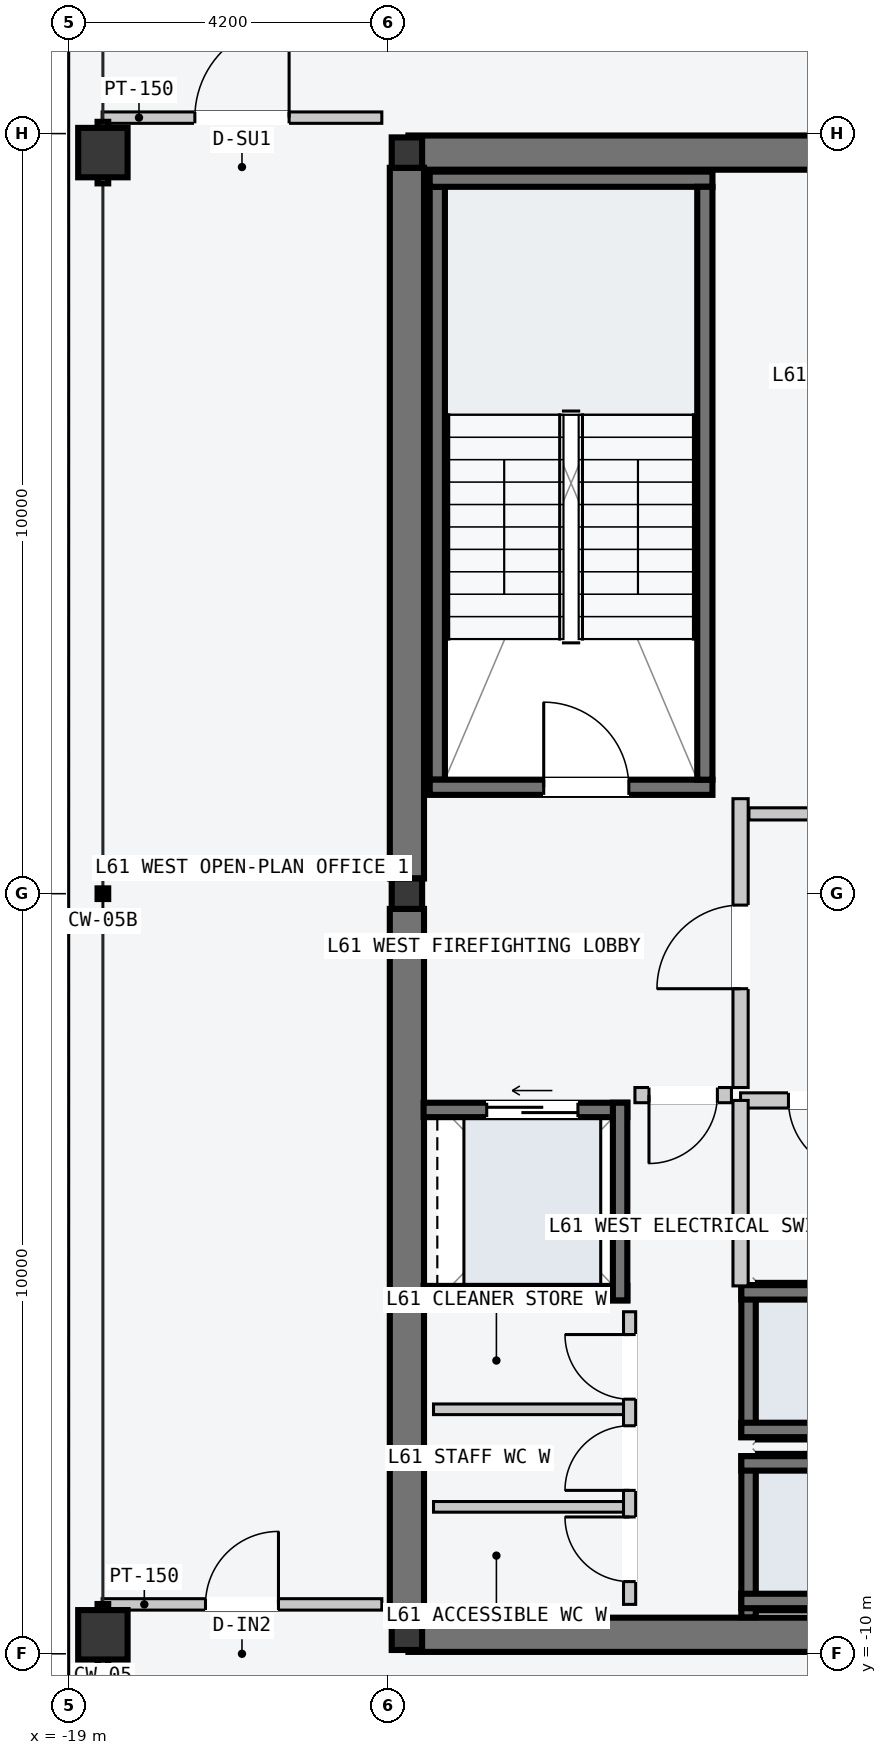
"""IFC4 building model, lengths in metres.
Left out: names, types, materials, properties, quantities, classifications, styles, units other than length and angle.
Written with IfcOpenShell. Run it as: python <this file> out.ifc"""

import sys

from ifc_helpers import new_model, si_unit, direction, frame, frame_2d, origin, origin_2d, place, context, subcontext, project, spatial, rectangle, hollow_rectangle, i_section, extrude, element, fill, save


model = new_model("IFC4")
c1 = context("Model", 3, precision=1e-05, world=origin(), true_north=direction((0.0, 1.0)))
c2 = subcontext(c1, "Body", "Model", "MODEL_VIEW")
j1 = project(units=[si_unit("LENGTHUNIT", "METRE"), si_unit("PLANEANGLEUNIT", "RADIAN")], contexts=[c1])
p1 = place(None, origin())
s1 = spatial("IfcSite", under=j1, at=p1, CompositionType="ELEMENT")
p2 = place(p1, origin())
s2 = spatial("IfcBuilding", under=s1, at=p2, CompositionType="ELEMENT")
p3 = place(p2, frame((0.0, 0.0, 232.8)))
s3 = spatial("IfcBuildingStorey", under=s2, at=p3, CompositionType="ELEMENT", Elevation=232.8)
for number, where, z_axis, x_axis in (
    (1, (-14.53, -9.75, -0.2), (0.0, 0.0, 1.0), (1.0, 0.0, 0.0)),
    (2, (-14.53, 9.75, -0.2), (0.0, 0.0, 1.0), (1.0, 0.0, 0.0)),
):
    element("IfcWall", number, at=place(p3, frame(where, z_axis=z_axis, x_axis=x_axis)), inside=s3, PredefinedType="SHEAR", context=c2, shape_type="SweptSolid", body=[
        extrude(rectangle(XDim=6.46, YDim=0.45, at=frame_2d((3.23, 0.0))), origin(), (0.0, 0.0, 1.0), 3.6),
    ])
for number, where, z_axis, x_axis in (
    (3, (-14.55, -9.55, -0.2), (0.0, 0.0, 1.0), (0.0, 1.0, 0.0)),
    (4, (-14.55, 0.2, -0.2), (0.0, 0.0, 1.0), (0.0, 1.0, 0.0)),
):
    element("IfcWall", number, at=place(p3, frame(where, z_axis=z_axis, x_axis=x_axis)), inside=s3, PredefinedType="SHEAR", context=c2, shape_type="SweptSolid", body=[
        extrude(rectangle(XDim=9.35, YDim=0.45, at=frame_2d((4.675, 0.0))), origin(), (0.0, 0.0, 1.0), 3.6),
    ])
p4 = place(p3, frame((-14.15, 1.5, -0.2), z_axis=(0.0, 0.0, 1.0), x_axis=(0.0, 1.0, 0.0)))
e5 = element("IfcWall", 5, at=p4, inside=s3, PredefinedType="SOLIDWALL", context=c2, shape_type="SweptSolid", body=[
    extrude(rectangle(XDim=7.8, YDim=0.2, at=frame_2d((3.9, 0.0))), origin(), (0.0, 0.0, 1.0), 3.6),
])
p5 = place(p3, frame((-14.25, 1.4, -0.2), z_axis=(0.0, 0.0, 1.0), x_axis=(1.0, 0.0, 0.0)))
e6 = element("IfcWall", 6, at=p5, inside=s3, PredefinedType="SOLIDWALL", context=c2, shape_type="SweptSolid", body=[
    extrude(rectangle(XDim=3.72, YDim=0.2, at=frame_2d((1.86, 0.0))), origin(), (0.0, 0.0, 1.0), 3.6),
])
p6 = place(p5, frame((1.5, 0.0, 0.2)))
e7 = element("IfcOpeningElement", 7, at=p6, cuts=e6, PredefinedType="OPENING", context=c2, shape_type="SweptSolid", body=[
    extrude(rectangle(XDim=1.12, YDim=2.18, at=frame_2d((0.56, 1.09))), frame((0.0, 0.11, 0.0), z_axis=(0.0, -1.0, 0.0), x_axis=(1.0, 0.0, 0.0)), (0.0, 0.0, 1.0), 0.22),
])
p7 = place(p3, frame((-14.25, 9.4, -0.2), z_axis=(0.0, 0.0, 1.0), x_axis=(1.0, 0.0, 0.0)))
e8 = element("IfcWall", 8, at=p7, inside=s3, PredefinedType="SOLIDWALL", context=c2, shape_type="SweptSolid", body=[
    extrude(rectangle(XDim=3.72, YDim=0.2, at=frame_2d((1.86, 0.0))), origin(), (0.0, 0.0, 1.0), 3.6),
])
p8 = place(p3, frame((-10.63, 1.5, -0.2), z_axis=(0.0, 0.0, 1.0), x_axis=(0.0, 1.0, 0.0)))
e9 = element("IfcWall", 9, at=p8, inside=s3, PredefinedType="SOLIDWALL", context=c2, shape_type="SweptSolid", body=[
    extrude(rectangle(XDim=7.8, YDim=0.2, at=frame_2d((3.9, 0.0))), origin(), (0.0, 0.0, 1.0), 3.6),
])
for number, where, z_axis, x_axis in (
    (10, (-14.55, -9.75, 0.0), (0.0, 0.0, 1.0), (1.0, 0.0, 0.0)),
    (11, (-14.55, 0.0, 0.0), (0.0, 0.0, 1.0), (1.0, 0.0, 0.0)),
    (12, (-14.55, 9.75, 0.0), (0.0, 0.0, 1.0), (1.0, 0.0, 0.0)),
):
    element("IfcColumn", number, at=place(p3, frame(where, z_axis=z_axis, x_axis=x_axis)), inside=s3, PredefinedType="COLUMN", context=c2, shape_type="SweptSolid", body=[
        extrude(i_section(OverallWidth=0.4, OverallDepth=0.4, WebThickness=0.013, FlangeThickness=0.021, at=origin_2d()), origin(), (0.0, 0.0, 1.0), 3.6),
    ])
for number, where, z_axis, x_axis in (
    (13, (-18.55, -9.75, 0.0), (0.0, 0.0, 1.0), (0.0, 1.0, 0.0)),
    (14, (-18.55, 9.75, 0.0), (0.0, 0.0, 1.0), (0.0, 1.0, 0.0)),
):
    element("IfcColumn", number, at=place(p3, frame(where, z_axis=z_axis, x_axis=x_axis)), inside=s3, PredefinedType="COLUMN", context=c2, shape_type="SweptSolid", body=[
        extrude(hollow_rectangle(XDim=0.65, YDim=0.65, WallThickness=0.028, at=origin_2d()), origin(), (0.0, 0.0, 1.0), 3.6),
    ])
p9 = place(p3, frame((-10.055, -9.52, -0.2), z_axis=(0.0, 0.0, 1.0), x_axis=(0.0, 1.0, 0.0)))
e15 = element("IfcWall", 15, at=p9, inside=s3, PredefinedType="SOLIDWALL", context=c2, shape_type="SweptSolid", body=[
    extrude(rectangle(XDim=2.12, YDim=0.19, at=frame_2d((1.06, 0.0))), origin(), (0.0, 0.0, 1.0), 3.6),
])
for number, where, z_axis, x_axis in (
    (16, (-10.15, -7.495, -0.2), (0.0, 0.0, 1.0), (1.0, 0.0, 0.0)),
    (17, (-10.15, -9.305, -0.2), (0.0, 0.0, 1.0), (1.0, 0.0, 0.0)),
):
    element("IfcWall", number, at=place(p3, frame(where, z_axis=z_axis, x_axis=x_axis)), inside=s3, PredefinedType="SOLIDWALL", context=c2, shape_type="SweptSolid", body=[
        extrude(rectangle(XDim=2.2, YDim=0.19, at=frame_2d((1.1, 0.0))), origin(), (0.0, 0.0, 1.0), 3.6),
    ])
p10 = place(p3, frame((-10.055, -7.15, -0.2), z_axis=(0.0, 0.0, 1.0), x_axis=(0.0, 1.0, 0.0)))
e18 = element("IfcWall", 18, at=p10, inside=s3, PredefinedType="SOLIDWALL", context=c2, shape_type="SweptSolid", body=[
    extrude(rectangle(XDim=2.0, YDim=0.19, at=frame_2d((1.0, 0.0))), origin(), (0.0, 0.0, 1.0), 3.6),
])
for number, where, z_axis, x_axis in (
    (19, (-10.15, -5.245, -0.2), (0.0, 0.0, 1.0), (1.0, 0.0, 0.0)),
    (20, (-10.15, -7.055, -0.2), (0.0, 0.0, 1.0), (1.0, 0.0, 0.0)),
):
    element("IfcWall", number, at=place(p3, frame(where, z_axis=z_axis, x_axis=x_axis)), inside=s3, PredefinedType="SOLIDWALL", context=c2, shape_type="SweptSolid", body=[
        extrude(rectangle(XDim=2.2, YDim=0.19, at=frame_2d((1.1, 0.0))), origin(), (0.0, 0.0, 1.0), 3.6),
    ])
p11 = place(p3, frame((-14.33, -2.845, -0.2), z_axis=(0.0, 0.0, 1.0), x_axis=(1.0, 0.0, 0.0)))
e21 = element("IfcWall", 21, at=p11, inside=s3, PredefinedType="SOLIDWALL", context=c2, shape_type="SweptSolid", body=[
    extrude(rectangle(XDim=2.68, YDim=0.19, at=frame_2d((1.34, 0.0))), origin(), (0.0, 0.0, 1.0), 3.6),
])
p12 = place(p11, frame((0.83, 0.0, 0.2)))
e22 = element("IfcOpeningElement", 22, at=p12, cuts=e21, PredefinedType="OPENING", context=c2, shape_type="SweptSolid", body=[
    extrude(rectangle(XDim=1.2, YDim=2.2, at=frame_2d((0.6, 1.1))), frame((0.0, 0.105, 0.0), z_axis=(0.0, -1.0, 0.0), x_axis=(1.0, 0.0, 0.0)), (0.0, 0.0, 1.0), 0.21),
])
p13 = place(p3, frame((-14.33, -5.255, -0.2), z_axis=(0.0, 0.0, 1.0), x_axis=(1.0, 0.0, 0.0)))
e23 = element("IfcWall", 23, at=p13, inside=s3, PredefinedType="SOLIDWALL", context=c2, shape_type="SweptSolid", body=[
    extrude(rectangle(XDim=2.68, YDim=0.19, at=frame_2d((1.34, 0.0))), origin(), (0.0, 0.0, 1.0), 3.6),
])
p14 = place(p3, frame((-11.745, -5.35, -0.2), z_axis=(0.0, 0.0, 1.0), x_axis=(0.0, 1.0, 0.0)))
e24 = element("IfcWall", 24, at=p14, inside=s3, PredefinedType="SOLIDWALL", context=c2, shape_type="SweptSolid", body=[
    extrude(rectangle(XDim=2.6, YDim=0.19, at=frame_2d((1.3, 0.0))), origin(), (0.0, 0.0, 1.0), 3.6),
])
p15 = place(p3, frame((-10.16, -2.55, 0.0), z_axis=(0.0, 0.0, 1.0), x_axis=(0.0, 1.0, 0.0)))
e25 = element("IfcWall", 25, at=p15, inside=s3, PredefinedType="PARTITIONING", context=c2, shape_type="SweptSolid", body=[
    extrude(rectangle(XDim=3.8, YDim=0.2, at=frame_2d((1.9, 0.0))), origin(), (0.0, 0.0, 1.0), 3.4),
])
p16 = place(p15, frame((1.3, 0.0, 0.0)))
e26 = element("IfcOpeningElement", 26, at=p16, cuts=e25, PredefinedType="OPENING", context=c2, shape_type="SweptSolid", body=[
    extrude(rectangle(XDim=1.1, YDim=2.15, at=frame_2d((0.55, 1.075))), frame((0.0, 0.11, 0.0), z_axis=(0.0, -1.0, 0.0), x_axis=(1.0, 0.0, 0.0)), (0.0, 0.0, 1.0), 0.22),
])
p17 = place(p3, frame((-10.28, -2.65, 0.0), z_axis=(0.0, 0.0, 1.0), x_axis=(-1.0, 0.0, 0.0)))
e27 = element("IfcWall", 27, at=p17, inside=s3, PredefinedType="PARTITIONING", context=c2, shape_type="SweptSolid", body=[
    extrude(rectangle(XDim=1.27, YDim=0.2, at=frame_2d((0.635, 0.0))), origin(), (0.0, 0.0, 1.0), 3.4),
])
p18 = place(p17, frame((0.185, 0.0, 0.0)))
e28 = element("IfcOpeningElement", 28, at=p18, cuts=e27, PredefinedType="OPENING", context=c2, shape_type="SweptSolid", body=[
    extrude(rectangle(XDim=0.9, YDim=2.15, at=frame_2d((0.45, 1.075))), frame((0.0, 0.11, 0.0), z_axis=(0.0, -1.0, 0.0), x_axis=(1.0, 0.0, 0.0)), (0.0, 0.0, 1.0), 0.22),
])
p19 = place(p3, frame((-7.96, -2.72, 0.0), z_axis=(0.0, 0.0, 1.0), x_axis=(-1.0, 0.0, 0.0)))
e29 = element("IfcWall", 29, at=p19, inside=s3, PredefinedType="PARTITIONING", context=c2, shape_type="SweptSolid", body=[
    extrude(rectangle(XDim=2.2, YDim=0.2, at=frame_2d((1.1, 0.0))), origin(), (0.0, 0.0, 1.0), 3.4),
])
p20 = place(p19, frame((0.62, 0.0, 0.0)))
e30 = element("IfcOpeningElement", 30, at=p20, cuts=e29, PredefinedType="OPENING", context=c2, shape_type="SweptSolid", body=[
    extrude(rectangle(XDim=0.95, YDim=2.1, at=frame_2d((0.475, 1.05))), frame((0.0, 0.11, 0.0), z_axis=(0.0, -1.0, 0.0), x_axis=(1.0, 0.0, 0.0)), (0.0, 0.0, 1.0), 0.22),
])
p21 = place(p3, frame((-10.16, -5.16, 0.0), z_axis=(0.0, 0.0, 1.0), x_axis=(0.0, 1.0, 0.0)))
e31 = element("IfcWall", 31, at=p21, inside=s3, PredefinedType="PARTITIONING", context=c2, shape_type="SweptSolid", body=[
    extrude(rectangle(XDim=2.44, YDim=0.2, at=frame_2d((1.22, 0.0))), origin(), (0.0, 0.0, 1.0), 3.4),
])
for number, where, z_axis, x_axis in (
    (32, (-11.7, -8.067, 0.0), (0.0, 0.0, 1.0), (-1.0, 0.0, 0.0)),
    (33, (-11.7, -6.783, 0.0), (0.0, 0.0, 1.0), (-1.0, 0.0, 0.0)),
):
    element("IfcWall", number, at=place(p3, frame(where, z_axis=z_axis, x_axis=x_axis)), inside=s3, PredefinedType="PARTITIONING", context=c2, shape_type="SweptSolid", body=[
        extrude(rectangle(XDim=2.5, YDim=0.14, at=frame_2d((1.25, 0.0))), origin(), (0.0, 0.0, 1.0), 3.4),
    ])
p22 = place(p3, frame((-11.62, -9.35, 0.0), z_axis=(0.0, 0.0, 1.0), x_axis=(0.0, 1.0, 0.0)))
e34 = element("IfcWall", 34, at=p22, inside=s3, PredefinedType="PARTITIONING", context=c2, shape_type="SweptSolid", body=[
    extrude(rectangle(XDim=3.85, YDim=0.16, at=frame_2d((1.925, 0.0))), origin(), (0.0, 0.0, 1.0), 3.4),
])
p23 = place(p22, frame((0.3, 0.0, 0.0)))
e35 = element("IfcOpeningElement", 35, at=p23, cuts=e34, PredefinedType="OPENING", context=c2, shape_type="SweptSolid", body=[
    extrude(rectangle(XDim=0.85, YDim=2.12, at=frame_2d((0.425, 1.06))), frame((0.0, 0.09, 0.0), z_axis=(0.0, -1.0, 0.0), x_axis=(1.0, 0.0, 0.0)), (0.0, 0.0, 1.0), 0.18),
])
p24 = place(p22, frame((1.5, 0.0, 0.0)))
e36 = element("IfcOpeningElement", 36, at=p24, cuts=e34, PredefinedType="OPENING", context=c2, shape_type="SweptSolid", body=[
    extrude(rectangle(XDim=0.85, YDim=2.12, at=frame_2d((0.425, 1.06))), frame((0.0, 0.09, 0.0), z_axis=(0.0, -1.0, 0.0), x_axis=(1.0, 0.0, 0.0)), (0.0, 0.0, 1.0), 0.18),
])
p25 = place(p22, frame((2.7, 0.0, 0.0)))
e37 = element("IfcOpeningElement", 37, at=p25, cuts=e34, PredefinedType="OPENING", context=c2, shape_type="SweptSolid", body=[
    extrude(rectangle(XDim=0.85, YDim=2.12, at=frame_2d((0.425, 1.06))), frame((0.0, 0.09, 0.0), z_axis=(0.0, -1.0, 0.0), x_axis=(1.0, 0.0, 0.0)), (0.0, 0.0, 1.0), 0.18),
])
p26 = place(p3, frame((-10.05, 1.05, 0.0), z_axis=(0.0, 0.0, 1.0), x_axis=(1.0, 0.0, 0.0)))
e38 = element("IfcWall", 38, at=p26, inside=s3, PredefinedType="PARTITIONING", context=c2, shape_type="SweptSolid", body=[
    extrude(rectangle(XDim=7.04, YDim=0.16, at=frame_2d((3.52, 0.0))), origin(), (0.0, 0.0, 1.0), 3.4),
])
p27 = place(p3, frame((-18.56, 10.21, 0.0), z_axis=(0.0, 0.0, 1.0), x_axis=(1.0, 0.0, 0.0)))
e39 = element("IfcWall", 39, at=p27, inside=s3, PredefinedType="PARTITIONING", context=c2, shape_type="SweptSolid", body=[
    extrude(rectangle(XDim=3.68, YDim=0.15, at=frame_2d((1.84, 0.0))), origin(), (0.0, 0.0, 1.0), 3.4),
])
p28 = place(p27, frame((1.22, 0.0, 0.0)))
e40 = element("IfcOpeningElement", 40, at=p28, cuts=e39, PredefinedType="OPENING", context=c2, shape_type="SweptSolid", body=[
    extrude(rectangle(XDim=1.24, YDim=2.24, at=frame_2d((0.62, 1.12))), frame((0.0, 0.085, 0.0), z_axis=(0.0, -1.0, 0.0), x_axis=(1.0, 0.0, 0.0)), (0.0, 0.0, 1.0), 0.17),
])
p29 = place(p3, frame((-18.56, -9.35, 0.0), z_axis=(0.0, 0.0, 1.0), x_axis=(1.0, 0.0, 0.0)))
e41 = element("IfcWall", 41, at=p29, inside=s3, PredefinedType="PARTITIONING", context=c2, shape_type="SweptSolid", body=[
    extrude(rectangle(XDim=3.68, YDim=0.15, at=frame_2d((1.84, 0.0))), origin(), (0.0, 0.0, 1.0), 3.4),
])
p30 = place(p29, frame((1.36, 0.0, 0.0)))
e42 = element("IfcOpeningElement", 42, at=p30, cuts=e41, PredefinedType="OPENING", context=c2, shape_type="SweptSolid", body=[
    extrude(rectangle(XDim=0.96, YDim=2.18, at=frame_2d((0.48, 1.09))), frame((0.0, 0.085, 0.0), z_axis=(0.0, -1.0, 0.0), x_axis=(1.0, 0.0, 0.0)), (0.0, 0.0, 1.0), 0.17),
])
p31 = place(p6, origin())
e43 = element("IfcDoor", 43, at=p31, inside=s3, OperationType="SINGLE_SWING_LEFT", PredefinedType="DOOR", context=c2, shape_type="SweptSolid", body=[
    extrude(rectangle(XDim=1.12, YDim=2.18, at=frame_2d((0.56, 1.09))), frame((0.0, 0.025, 0.0), z_axis=(0.0, -1.0, 0.0), x_axis=(1.0, 0.0, 0.0)), (0.0, 0.0, 1.0), 0.05),
])
fill(e7, e43)
p32 = place(p12, origin())
e44 = element("IfcDoor", 44, at=p32, inside=s3, OperationType="SLIDING_TO_LEFT", PredefinedType="DOOR", context=c2, shape_type="SweptSolid", body=[
    extrude(rectangle(XDim=1.2, YDim=2.2, at=frame_2d((0.6, 1.1))), frame((0.0, 0.025, 0.0), z_axis=(0.0, -1.0, 0.0), x_axis=(1.0, 0.0, 0.0)), (0.0, 0.0, 1.0), 0.05),
])
fill(e22, e44)
p33 = place(p16, origin())
e45 = element("IfcDoor", 45, at=p33, inside=s3, OperationType="SINGLE_SWING_LEFT", PredefinedType="DOOR", context=c2, shape_type="SweptSolid", body=[
    extrude(rectangle(XDim=1.1, YDim=2.15, at=frame_2d((0.55, 1.075))), frame((0.0, 0.025, 0.0), z_axis=(0.0, -1.0, 0.0), x_axis=(1.0, 0.0, 0.0)), (0.0, 0.0, 1.0), 0.05),
])
fill(e26, e45)
p34 = place(p18, origin())
e46 = element("IfcDoor", 46, at=p34, inside=s3, OperationType="SINGLE_SWING_RIGHT", PredefinedType="DOOR", context=c2, shape_type="SweptSolid", body=[
    extrude(rectangle(XDim=0.9, YDim=2.15, at=frame_2d((0.45, 1.075))), frame((0.0, 0.025, 0.0), z_axis=(0.0, -1.0, 0.0), x_axis=(1.0, 0.0, 0.0)), (0.0, 0.0, 1.0), 0.05),
])
fill(e28, e46)
p35 = place(p20, origin())
e47 = element("IfcDoor", 47, at=p35, inside=s3, OperationType="SINGLE_SWING_LEFT", PredefinedType="DOOR", context=c2, shape_type="SweptSolid", body=[
    extrude(rectangle(XDim=0.95, YDim=2.1, at=frame_2d((0.475, 1.05))), frame((0.0, 0.025, 0.0), z_axis=(0.0, -1.0, 0.0), x_axis=(1.0, 0.0, 0.0)), (0.0, 0.0, 1.0), 0.05),
])
fill(e30, e47)
p36 = place(p23, origin())
e48 = element("IfcDoor", 48, at=p36, inside=s3, OperationType="SINGLE_SWING_RIGHT", PredefinedType="DOOR", context=c2, shape_type="SweptSolid", body=[
    extrude(rectangle(XDim=0.85, YDim=2.12, at=frame_2d((0.425, 1.06))), frame((0.0, 0.025, 0.0), z_axis=(0.0, -1.0, 0.0), x_axis=(1.0, 0.0, 0.0)), (0.0, 0.0, 1.0), 0.05),
])
fill(e35, e48)
p37 = place(p24, origin())
e49 = element("IfcDoor", 49, at=p37, inside=s3, OperationType="SINGLE_SWING_LEFT", PredefinedType="DOOR", context=c2, shape_type="SweptSolid", body=[
    extrude(rectangle(XDim=0.85, YDim=2.12, at=frame_2d((0.425, 1.06))), frame((0.0, 0.025, 0.0), z_axis=(0.0, -1.0, 0.0), x_axis=(1.0, 0.0, 0.0)), (0.0, 0.0, 1.0), 0.05),
])
fill(e36, e49)
p38 = place(p25, origin())
e50 = element("IfcDoor", 50, at=p38, inside=s3, OperationType="SINGLE_SWING_RIGHT", PredefinedType="DOOR", context=c2, shape_type="SweptSolid", body=[
    extrude(rectangle(XDim=0.85, YDim=2.12, at=frame_2d((0.425, 1.06))), frame((0.0, 0.025, 0.0), z_axis=(0.0, -1.0, 0.0), x_axis=(1.0, 0.0, 0.0)), (0.0, 0.0, 1.0), 0.05),
])
fill(e37, e50)
p39 = place(p28, origin())
e51 = element("IfcDoor", 51, at=p39, inside=s3, OperationType="SINGLE_SWING_RIGHT", PredefinedType="DOOR", context=c2, shape_type="SweptSolid", body=[
    extrude(rectangle(XDim=1.24, YDim=2.24, at=frame_2d((0.62, 1.12))), frame((0.0, 0.025, 0.0), z_axis=(0.0, -1.0, 0.0), x_axis=(1.0, 0.0, 0.0)), (0.0, 0.0, 1.0), 0.05),
])
fill(e40, e51)
p40 = place(p30, origin())
e52 = element("IfcDoor", 52, at=p40, inside=s3, OperationType="SINGLE_SWING_RIGHT", PredefinedType="DOOR", context=c2, shape_type="SweptSolid", body=[
    extrude(rectangle(XDim=0.96, YDim=2.18, at=frame_2d((0.48, 1.09))), frame((0.0, 0.025, 0.0), z_axis=(0.0, -1.0, 0.0), x_axis=(1.0, 0.0, 0.0)), (0.0, 0.0, 1.0), 0.05),
])
fill(e42, e52)
save(model, sys.argv[1])
